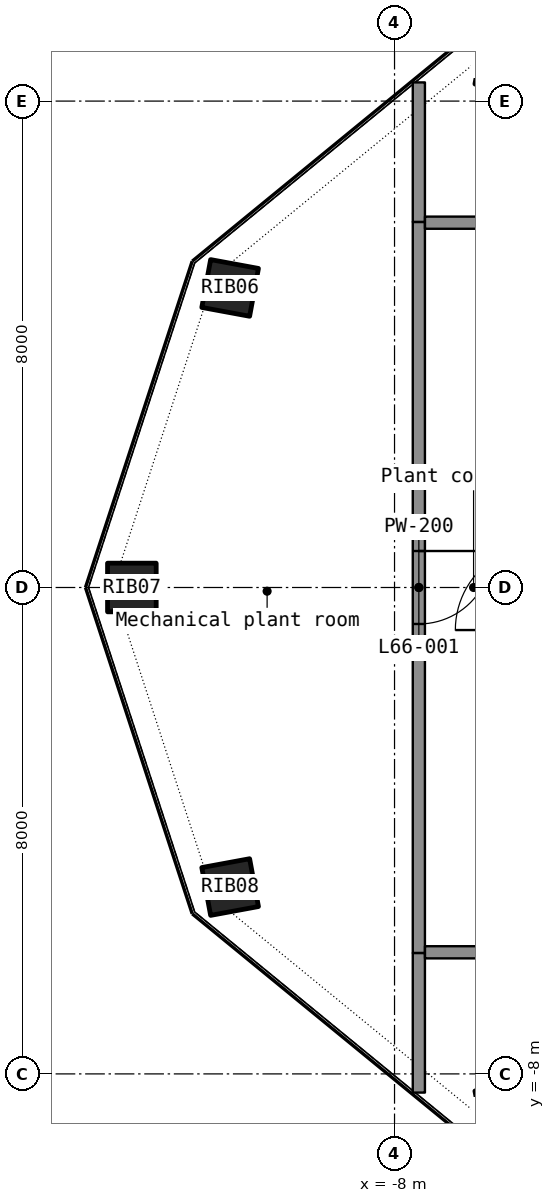
"""IFC4 building model, lengths in metres.
Left out: names, types, materials, properties, quantities, classifications, styles, units other than length and angle.
Written with IfcOpenShell. Run it as: python <this file> out.ifc"""

import sys

from ifc_helpers import new_model, si_unit, direction, frame, frame_2d, origin, origin_2d, place, context, subcontext, project, spatial, rectangle, hollow_rectangle, extrude, element, fill, save


model = new_model("IFC4")
c1 = context("Model", 3, precision=1e-05, world=origin(), true_north=direction((0.0, 1.0)))
c2 = subcontext(c1, "Body", "Model", "MODEL_VIEW")
j1 = project(units=[si_unit("LENGTHUNIT", "METRE"), si_unit("PLANEANGLEUNIT", "RADIAN")], contexts=[c1])
p1 = place(None, origin())
s1 = spatial("IfcSite", under=j1, at=p1, CompositionType="ELEMENT")
p2 = place(p1, origin())
s2 = spatial("IfcBuilding", under=s1, at=p2, CompositionType="ELEMENT")
p3 = place(p2, frame((0.0, 0.0, 272.6)))
s3 = spatial("IfcBuildingStorey", under=s2, at=p3, CompositionType="ELEMENT", Elevation=272.6)
p4 = place(p3, frame((-6.211, 8.601, 0.0), z_axis=(0.06918715, -0.095854973, 0.992987896), x_axis=(0.903382147, 0.428292118, -0.021599968)))
e1 = element("IfcColumn", 1, at=p4, inside=s3, PredefinedType="COLUMN", context=c2, shape_type="SweptSolid", body=[
    extrude(hollow_rectangle(XDim=0.8, YDim=0.8, WallThickness=0.025, at=origin_2d()), origin(), (0.0, 0.0, 1.0), 3.927),
])
p5 = place(p3, frame((-10.704, 4.927, 0.0), z_axis=(0.1190343, -0.054862524, 0.991373259), x_axis=(0.575106985, 0.817731936, -0.023799935)))
e2 = element("IfcColumn", 2, at=p5, inside=s3, PredefinedType="COLUMN", context=c2, shape_type="SweptSolid", body=[
    extrude(hollow_rectangle(XDim=0.8, YDim=0.8, WallThickness=0.025, at=origin_2d()), origin(), (0.0, 0.0, 1.0), 3.934),
])
p6 = place(p3, frame((-12.32, 0.0, 0.0), z_axis=(0.136861927, 0.0, 0.990590134), x_axis=(0.0, 1.0, 0.0)))
e3 = element("IfcColumn", 3, at=p6, inside=s3, PredefinedType="COLUMN", context=c2, shape_type="SweptSolid", body=[
    extrude(hollow_rectangle(XDim=0.8, YDim=0.8, WallThickness=0.025, at=origin_2d()), origin(), (0.0, 0.0, 1.0), 3.937),
])
p7 = place(p3, frame((-10.704, -4.927, 0.0), z_axis=(0.1190343, 0.054862524, 0.991373259), x_axis=(-0.575106985, 0.817731936, 0.023799935)))
e4 = element("IfcColumn", 4, at=p7, inside=s3, PredefinedType="COLUMN", context=c2, shape_type="SweptSolid", body=[
    extrude(hollow_rectangle(XDim=0.8, YDim=0.8, WallThickness=0.025, at=origin_2d()), origin(), (0.0, 0.0, 1.0), 3.934),
])
p8 = place(p3, frame((-6.211, -8.601, 0.0), z_axis=(0.06918715, 0.095854973, 0.992987896), x_axis=(-0.903382147, 0.428292118, 0.021599968)))
e5 = element("IfcColumn", 5, at=p8, inside=s3, PredefinedType="COLUMN", context=c2, shape_type="SweptSolid", body=[
    extrude(hollow_rectangle(XDim=0.8, YDim=0.8, WallThickness=0.025, at=origin_2d()), origin(), (0.0, 0.0, 1.0), 3.927),
])
p9 = place(p3, frame((-7.6, 6.012, 0.0), z_axis=(0.0, 0.0, 1.0), x_axis=(0.0, -1.0, 0.0)))
e6 = element("IfcWall", 6, at=p9, inside=s3, PredefinedType="PARTITIONING", context=c2, shape_type="SweptSolid", body=[
    extrude(rectangle(XDim=12.024, YDim=0.2, at=frame_2d((6.012, 0.0))), origin(), (0.0, 0.0, 1.0), 2.9),
])
p10 = place(p9, frame((5.412, 0.0, 0.0)))
e7 = element("IfcOpeningElement", 7, at=p10, cuts=e6, PredefinedType="OPENING", context=c2, shape_type="SweptSolid", body=[
    extrude(rectangle(XDim=1.2, YDim=2.2, at=frame_2d((0.6, 1.1))), frame((0.0, 0.11, 0.0), z_axis=(0.0, -1.0, 0.0), x_axis=(1.0, 0.0, 0.0)), (0.0, 0.0, 1.0), 0.22),
])
for number, where, z_axis, x_axis in (
    (8, (-7.6, -8.307, 0.0), (0.0, 0.0, 1.0), (0.0, 1.0, 0.0)),
    (9, (-7.6, 6.013, 0.0), (0.0, 0.0, 1.0), (0.0, 1.0, 0.0)),
):
    element("IfcWall", number, at=place(p3, frame(where, z_axis=z_axis, x_axis=x_axis)), inside=s3, PredefinedType="PARTITIONING", context=c2, shape_type="SweptSolid", body=[
        extrude(rectangle(XDim=2.294, YDim=0.2, at=frame_2d((1.147, 0.0))), origin(), (0.0, 0.0, 1.0), 2.9),
    ])
for number, where, z_axis, x_axis in (
    (10, (-7.499, -6.0, 0.0), (0.0, 0.0, 1.0), (1.0, 0.0, 0.0)),
    (11, (-5.813, 6.0, 0.0), (0.0, 0.0, 1.0), (-1.0, 0.0, 0.0)),
):
    element("IfcWall", number, at=place(p3, frame(where, z_axis=z_axis, x_axis=x_axis)), inside=s3, PredefinedType="PARTITIONING", context=c2, shape_type="SweptSolid", body=[
        extrude(rectangle(XDim=1.686, YDim=0.2, at=frame_2d((0.843, 0.0))), origin(), (0.0, 0.0, 1.0), 2.9),
    ])
p11 = place(p10, origin())
e12 = element("IfcDoor", 12, at=p11, inside=s3, OperationType="DOUBLE_DOOR_SINGLE_SWING", PredefinedType="DOOR", context=c2, shape_type="SweptSolid", body=[
    extrude(rectangle(XDim=1.2, YDim=2.2, at=frame_2d((0.6, 1.1))), frame((0.0, 0.025, 0.0), z_axis=(0.0, -1.0, 0.0), x_axis=(1.0, 0.0, 0.0)), (0.0, 0.0, 1.0), 0.05),
])
fill(e7, e12)
save(model, sys.argv[1])
